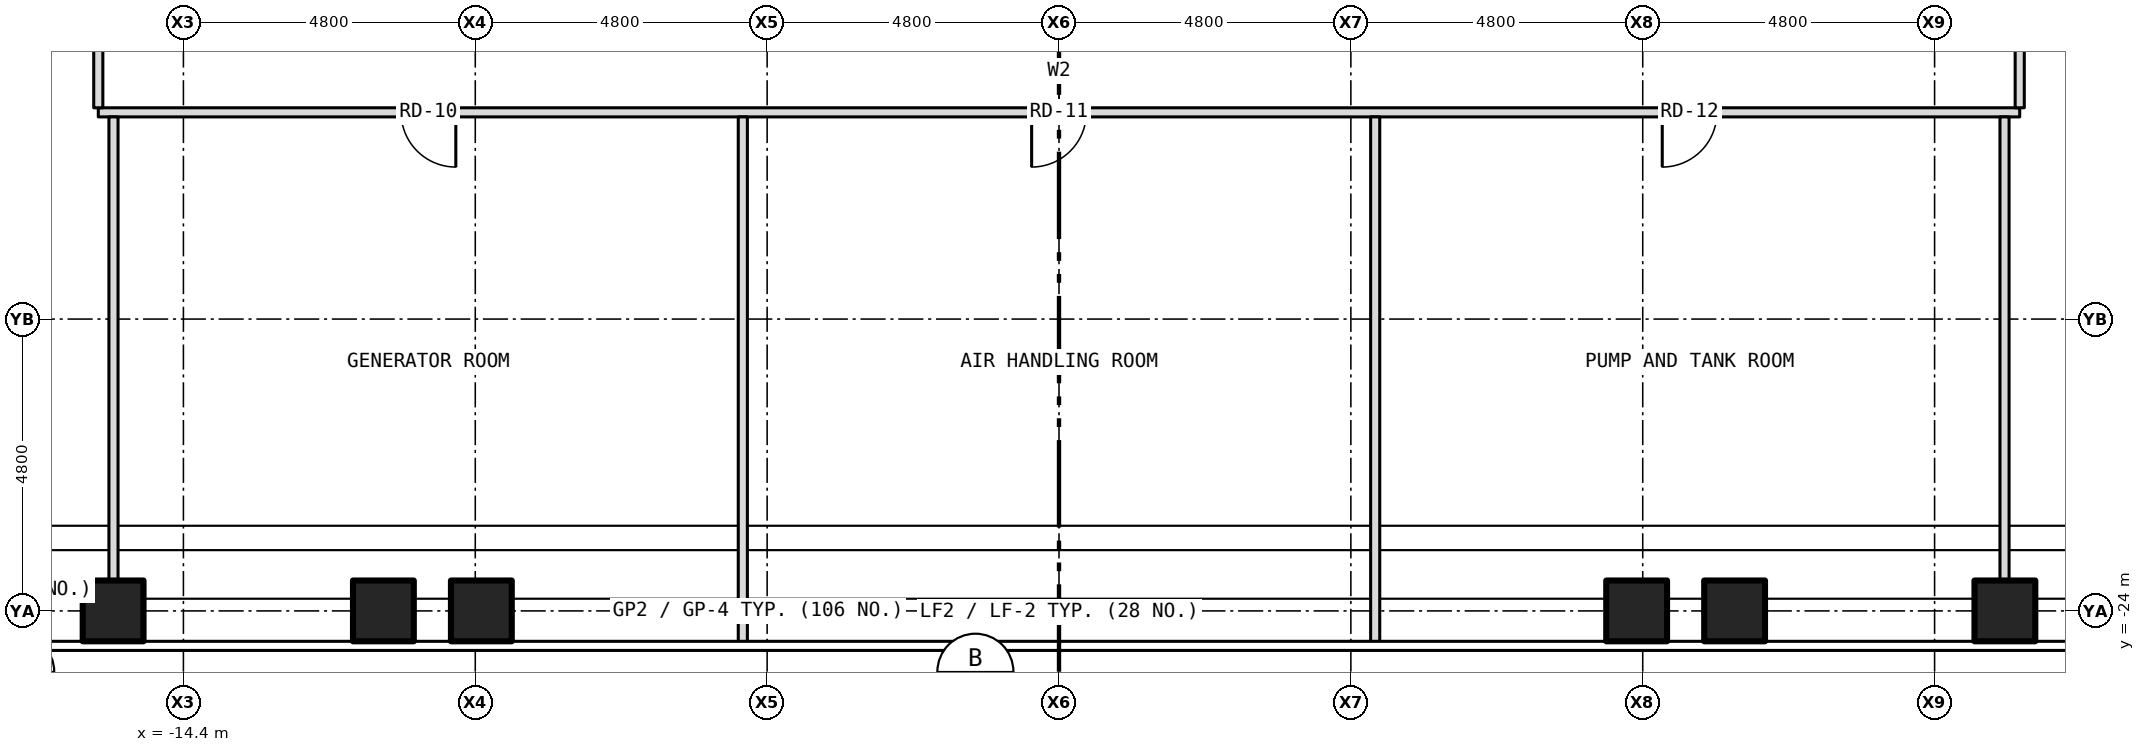
"""IFC4 building model, lengths in metres.
Left out: names, types, materials, properties, quantities, classifications, styles, units other than length and angle.
Written with IfcOpenShell. Run it as: python <this file> out.ifc"""

import sys

from ifc_helpers import new_model, si_unit, direction, frame, frame_2d, origin, origin_2d, place, context, subcontext, project, spatial, rectangle, hollow_rectangle, extrude, element, fill, save


model = new_model("IFC4")
c1 = context("Model", 3, precision=1e-05, world=origin(), true_north=direction((0.0, 1.0)))
c2 = subcontext(c1, "Body", "Model", "MODEL_VIEW")
j1 = project(units=[si_unit("LENGTHUNIT", "METRE"), si_unit("PLANEANGLEUNIT", "RADIAN")], contexts=[c1])
p1 = place(None, origin())
s1 = spatial("IfcSite", under=j1, at=p1, CompositionType="ELEMENT")
p2 = place(p1, origin())
s2 = spatial("IfcBuilding", under=s1, at=p2, CompositionType="ELEMENT")
p3 = place(p2, frame((0.0, 0.0, 84.5)))
s3 = spatial("IfcBuildingStorey", under=s2, at=p3, CompositionType="ELEMENT", Elevation=84.5)
for number, where, z_axis, x_axis in (
    (1, (-15.556, -24.0, -0.3), (0.0, 0.0, 1.0), (1.0, 0.0, 0.0)),
    (2, (-11.111, -24.0, -0.3), (0.0, 0.0, 1.0), (1.0, 0.0, 0.0)),
    (3, (11.111, -24.0, -0.3), (0.0, 0.0, 1.0), (1.0, 0.0, 0.0)),
    (4, (15.556, -24.0, -0.3), (0.0, 0.0, 1.0), (1.0, 0.0, 0.0)),
    (5, (-9.5, -24.0, -0.3), (0.0, 0.0, 1.0), (1.0, 0.0, 0.0)),
    (6, (9.5, -24.0, -0.3), (0.0, 0.0, 1.0), (1.0, 0.0, 0.0)),
):
    element("IfcColumn", number, at=place(p3, frame(where, z_axis=z_axis, x_axis=x_axis)), inside=s3, PredefinedType="COLUMN", context=c2, shape_type="SweptSolid", body=[
        extrude(hollow_rectangle(XDim=1.0, YDim=1.0, WallThickness=0.06, at=origin_2d()), origin(), (0.0, 0.0, 1.0), 4.65),
    ])
p4 = place(p3, frame((-15.8, -15.8, 0.0), z_axis=(0.0, 0.0, 1.0), x_axis=(1.0, 0.0, 0.0)))
e7 = element("IfcWall", 7, at=p4, inside=s3, PredefinedType="PARTITIONING", context=c2, shape_type="SweptSolid", body=[
    extrude(rectangle(XDim=31.6, YDim=0.15, at=frame_2d((15.8, 0.0))), origin(), (0.0, 0.0, 1.0), 4.35),
])
p5 = place(p4, frame((4.98, 0.0, 0.0)))
e8 = element("IfcOpeningElement", 8, at=p5, cuts=e7, PredefinedType="OPENING", context=c2, shape_type="SweptSolid", body=[
    extrude(rectangle(XDim=0.9, YDim=2.1, at=frame_2d((0.45, 1.05))), frame((0.0, 0.087, 0.0), z_axis=(0.0, -1.0, 0.0), x_axis=(1.0, 0.0, 0.0)), (0.0, 0.0, 1.0), 0.174),
])
p6 = place(p4, frame((15.35, 0.0, 0.0)))
e9 = element("IfcOpeningElement", 9, at=p6, cuts=e7, PredefinedType="OPENING", context=c2, shape_type="SweptSolid", body=[
    extrude(rectangle(XDim=0.9, YDim=2.1, at=frame_2d((0.45, 1.05))), frame((0.0, 0.087, 0.0), z_axis=(0.0, -1.0, 0.0), x_axis=(1.0, 0.0, 0.0)), (0.0, 0.0, 1.0), 0.174),
])
p7 = place(p4, frame((25.721, 0.0, 0.0)))
e10 = element("IfcOpeningElement", 10, at=p7, cuts=e7, PredefinedType="OPENING", context=c2, shape_type="SweptSolid", body=[
    extrude(rectangle(XDim=0.9, YDim=2.1, at=frame_2d((0.45, 1.05))), frame((0.0, 0.087, 0.0), z_axis=(0.0, -1.0, 0.0), x_axis=(1.0, 0.0, 0.0)), (0.0, 0.0, 1.0), 0.174),
])
p8 = place(p3, frame((-15.8, -15.725, 0.0), z_axis=(0.0, 0.0, 1.0), x_axis=(0.0, 1.0, 0.0)))
e11 = element("IfcWall", 11, at=p8, inside=s3, PredefinedType="PARTITIONING", context=c2, shape_type="SweptSolid", body=[
    extrude(rectangle(XDim=4.805, YDim=0.15, at=frame_2d((2.403, 0.0))), origin(), (0.0, 0.0, 1.0), 4.35),
])
p9 = place(p8, frame((3.075, 0.0, 0.0)))
e12 = element("IfcOpeningElement", 12, at=p9, cuts=e11, PredefinedType="OPENING", context=c2, shape_type="SweptSolid", body=[
    extrude(rectangle(XDim=0.9, YDim=2.1, at=frame_2d((0.45, 1.05))), frame((0.0, 0.087, 0.0), z_axis=(0.0, -1.0, 0.0), x_axis=(1.0, 0.0, 0.0)), (0.0, 0.0, 1.0), 0.174),
])
p10 = place(p3, frame((-15.55, -23.88, 0.0), z_axis=(0.0, 0.0, 1.0), x_axis=(0.0, 1.0, 0.0)))
e13 = element("IfcWall", 13, at=p10, inside=s3, PredefinedType="PARTITIONING", context=c2, shape_type="SweptSolid", body=[
    extrude(rectangle(XDim=8.005, YDim=0.15, at=frame_2d((4.002, 0.0))), origin(), (0.0, 0.0, 1.0), 4.35),
])
for number, where, z_axis, x_axis in (
    (14, (-5.2, -24.53, 0.0), (0.0, 0.0, 1.0), (0.0, 1.0, 0.0)),
    (15, (5.2, -24.53, 0.0), (0.0, 0.0, 1.0), (0.0, 1.0, 0.0)),
):
    element("IfcWall", number, at=place(p3, frame(where, z_axis=z_axis, x_axis=x_axis)), inside=s3, PredefinedType="PARTITIONING", context=c2, shape_type="SweptSolid", body=[
        extrude(rectangle(XDim=8.655, YDim=0.15, at=frame_2d((4.328, 0.0))), origin(), (0.0, 0.0, 1.0), 4.35),
    ])
p11 = place(p3, frame((15.55, -23.88, 0.0), z_axis=(0.0, 0.0, 1.0), x_axis=(0.0, 1.0, 0.0)))
e16 = element("IfcWall", 16, at=p11, inside=s3, PredefinedType="PARTITIONING", context=c2, shape_type="SweptSolid", body=[
    extrude(rectangle(XDim=8.005, YDim=0.15, at=frame_2d((4.002, 0.0))), origin(), (0.0, 0.0, 1.0), 4.35),
])
p12 = place(p3, frame((15.8, -15.725, 0.0), z_axis=(0.0, 0.0, 1.0), x_axis=(0.0, 1.0, 0.0)))
e17 = element("IfcWall", 17, at=p12, inside=s3, PredefinedType="PARTITIONING", context=c2, shape_type="SweptSolid", body=[
    extrude(rectangle(XDim=4.805, YDim=0.15, at=frame_2d((2.403, 0.0))), origin(), (0.0, 0.0, 1.0), 4.35),
])
p13 = place(p12, frame((3.075, 0.0, 0.0)))
e18 = element("IfcOpeningElement", 18, at=p13, cuts=e17, PredefinedType="OPENING", context=c2, shape_type="SweptSolid", body=[
    extrude(rectangle(XDim=0.9, YDim=2.1, at=frame_2d((0.45, 1.05))), frame((0.0, 0.087, 0.0), z_axis=(0.0, -1.0, 0.0), x_axis=(1.0, 0.0, 0.0)), (0.0, 0.0, 1.0), 0.174),
])
p14 = place(p5, origin())
e19 = element("IfcDoor", 19, at=p14, inside=s3, OperationType="SINGLE_SWING_RIGHT", PredefinedType="DOOR", context=c2, shape_type="SweptSolid", body=[
    extrude(rectangle(XDim=0.9, YDim=2.1, at=frame_2d((0.45, 1.05))), frame((0.0, 0.025, 0.0), z_axis=(0.0, -1.0, 0.0), x_axis=(1.0, 0.0, 0.0)), (0.0, 0.0, 1.0), 0.05),
])
fill(e8, e19)
p15 = place(p6, origin())
e20 = element("IfcDoor", 20, at=p15, inside=s3, OperationType="SINGLE_SWING_LEFT", PredefinedType="DOOR", context=c2, shape_type="SweptSolid", body=[
    extrude(rectangle(XDim=0.9, YDim=2.1, at=frame_2d((0.45, 1.05))), frame((0.0, 0.025, 0.0), z_axis=(0.0, -1.0, 0.0), x_axis=(1.0, 0.0, 0.0)), (0.0, 0.0, 1.0), 0.05),
])
fill(e9, e20)
p16 = place(p7, origin())
e21 = element("IfcDoor", 21, at=p16, inside=s3, OperationType="SINGLE_SWING_LEFT", PredefinedType="DOOR", context=c2, shape_type="SweptSolid", body=[
    extrude(rectangle(XDim=0.9, YDim=2.1, at=frame_2d((0.45, 1.05))), frame((0.0, 0.025, 0.0), z_axis=(0.0, -1.0, 0.0), x_axis=(1.0, 0.0, 0.0)), (0.0, 0.0, 1.0), 0.05),
])
fill(e10, e21)
save(model, sys.argv[1])
